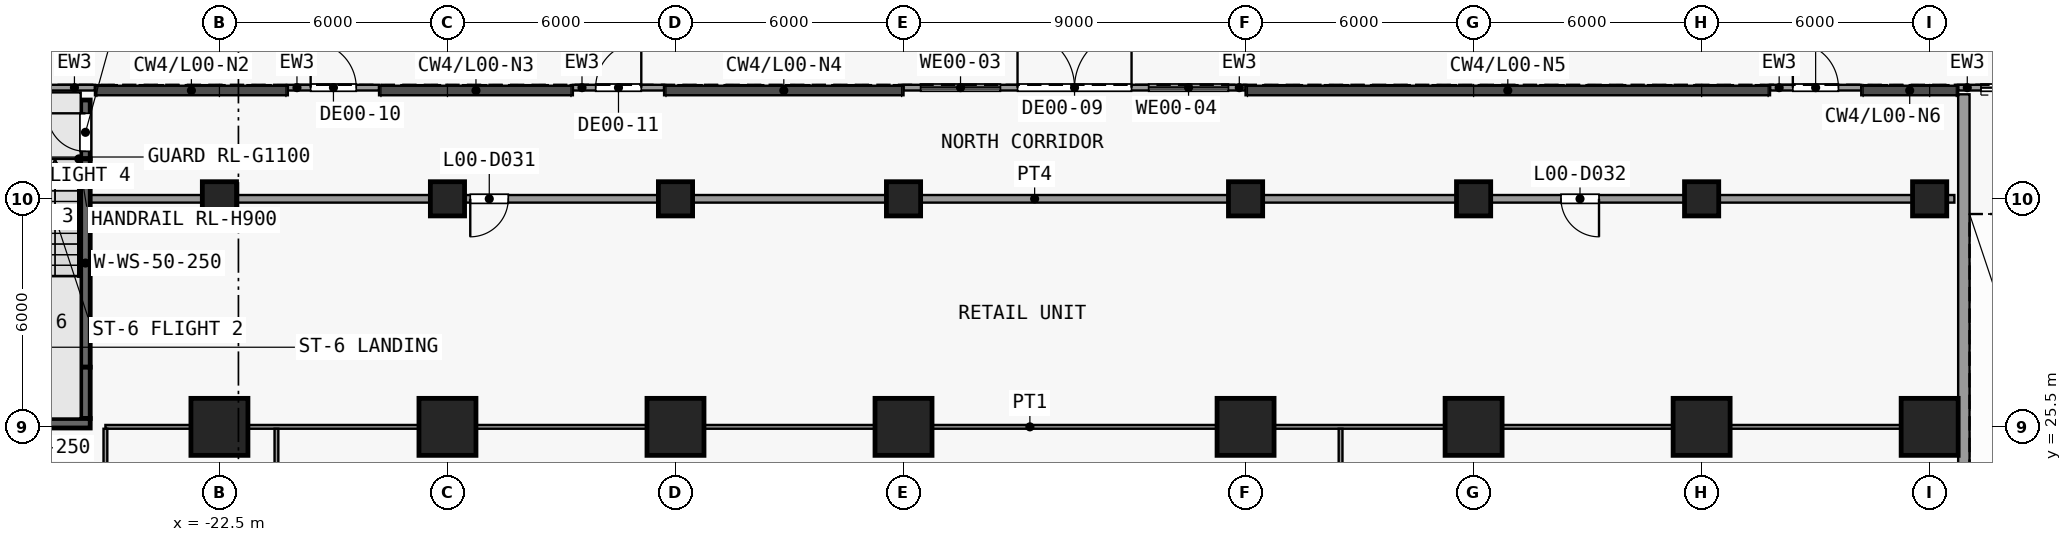
"""IFC4 building model, lengths in metres.
Left out: names, types, materials, properties, quantities, classifications, styles, units other than length and angle.
Written with IfcOpenShell. Run it as: python <this file> out.ifc"""

import sys

from ifc_helpers import new_model, si_unit, direction, frame, frame_2d, origin, origin_2d, place, context, subcontext, project, spatial, rectangle, extrude, element, fill, save


model = new_model("IFC4")
c1 = context("Model", 3, precision=1e-05, world=origin(), true_north=direction((0.0, 1.0)))
c2 = subcontext(c1, "Body", "Model", "MODEL_VIEW")
j1 = project(units=[si_unit("LENGTHUNIT", "METRE"), si_unit("PLANEANGLEUNIT", "RADIAN")], contexts=[c1])
p1 = place(None, origin())
s1 = spatial("IfcSite", under=j1, at=p1, CompositionType="ELEMENT")
p2 = place(p1, origin())
s2 = spatial("IfcBuilding", under=s1, at=p2, CompositionType="ELEMENT")
p3 = place(p2, origin())
s3 = spatial("IfcBuildingStorey", under=s2, at=p3, CompositionType="ELEMENT", Elevation=0.0)
p4 = place(p3, frame((-22.5, 25.5, 0.0), z_axis=(0.0, 0.0, 1.0), x_axis=(1.0, 0.0, 0.0)))
e1 = element("IfcColumn", 1, at=p4, inside=s3, PredefinedType="COLUMN", context=c2, shape_type="SweptSolid", body=[
    extrude(rectangle(XDim=1.5, YDim=1.5, at=origin_2d()), origin(), (0.0, 0.0, 1.0), 8.0),
])
p5 = place(p3, frame((-22.5, 31.5, 0.0), z_axis=(0.0, 0.0, 1.0), x_axis=(1.0, 0.0, 0.0)))
e2 = element("IfcColumn", 2, at=p5, inside=s3, PredefinedType="COLUMN", context=c2, shape_type="SweptSolid", body=[
    extrude(rectangle(XDim=0.9, YDim=0.9, at=origin_2d()), origin(), (0.0, 0.0, 1.0), 8.0),
])
p6 = place(p3, frame((-16.5, 25.5, 0.0), z_axis=(0.0, 0.0, 1.0), x_axis=(1.0, 0.0, 0.0)))
e3 = element("IfcColumn", 3, at=p6, inside=s3, PredefinedType="COLUMN", context=c2, shape_type="SweptSolid", body=[
    extrude(rectangle(XDim=1.5, YDim=1.5, at=origin_2d()), origin(), (0.0, 0.0, 1.0), 8.0),
])
p7 = place(p3, frame((-16.5, 31.5, 0.0), z_axis=(0.0, 0.0, 1.0), x_axis=(1.0, 0.0, 0.0)))
e4 = element("IfcColumn", 4, at=p7, inside=s3, PredefinedType="COLUMN", context=c2, shape_type="SweptSolid", body=[
    extrude(rectangle(XDim=0.9, YDim=0.9, at=origin_2d()), origin(), (0.0, 0.0, 1.0), 8.0),
])
p8 = place(p3, frame((-10.5, 25.5, 0.0), z_axis=(0.0, 0.0, 1.0), x_axis=(1.0, 0.0, 0.0)))
e5 = element("IfcColumn", 5, at=p8, inside=s3, PredefinedType="COLUMN", context=c2, shape_type="SweptSolid", body=[
    extrude(rectangle(XDim=1.5, YDim=1.5, at=origin_2d()), origin(), (0.0, 0.0, 1.0), 8.0),
])
p9 = place(p3, frame((-10.5, 31.5, 0.0), z_axis=(0.0, 0.0, 1.0), x_axis=(1.0, 0.0, 0.0)))
e6 = element("IfcColumn", 6, at=p9, inside=s3, PredefinedType="COLUMN", context=c2, shape_type="SweptSolid", body=[
    extrude(rectangle(XDim=0.9, YDim=0.9, at=origin_2d()), origin(), (0.0, 0.0, 1.0), 8.0),
])
p10 = place(p3, frame((-4.5, 25.5, 0.0), z_axis=(0.0, 0.0, 1.0), x_axis=(1.0, 0.0, 0.0)))
e7 = element("IfcColumn", 7, at=p10, inside=s3, PredefinedType="COLUMN", context=c2, shape_type="SweptSolid", body=[
    extrude(rectangle(XDim=1.5, YDim=1.5, at=origin_2d()), origin(), (0.0, 0.0, 1.0), 8.0),
])
p11 = place(p3, frame((-4.5, 31.5, 0.0), z_axis=(0.0, 0.0, 1.0), x_axis=(1.0, 0.0, 0.0)))
e8 = element("IfcColumn", 8, at=p11, inside=s3, PredefinedType="COLUMN", context=c2, shape_type="SweptSolid", body=[
    extrude(rectangle(XDim=0.9, YDim=0.9, at=origin_2d()), origin(), (0.0, 0.0, 1.0), 8.0),
])
p12 = place(p3, frame((4.5, 25.5, 0.0), z_axis=(0.0, 0.0, 1.0), x_axis=(1.0, 0.0, 0.0)))
e9 = element("IfcColumn", 9, at=p12, inside=s3, PredefinedType="COLUMN", context=c2, shape_type="SweptSolid", body=[
    extrude(rectangle(XDim=1.5, YDim=1.5, at=origin_2d()), origin(), (0.0, 0.0, 1.0), 8.0),
])
p13 = place(p3, frame((4.5, 31.5, 0.0), z_axis=(0.0, 0.0, 1.0), x_axis=(1.0, 0.0, 0.0)))
e10 = element("IfcColumn", 10, at=p13, inside=s3, PredefinedType="COLUMN", context=c2, shape_type="SweptSolid", body=[
    extrude(rectangle(XDim=0.9, YDim=0.9, at=origin_2d()), origin(), (0.0, 0.0, 1.0), 8.0),
])
p14 = place(p3, frame((10.5, 25.5, 0.0), z_axis=(0.0, 0.0, 1.0), x_axis=(1.0, 0.0, 0.0)))
e11 = element("IfcColumn", 11, at=p14, inside=s3, PredefinedType="COLUMN", context=c2, shape_type="SweptSolid", body=[
    extrude(rectangle(XDim=1.5, YDim=1.5, at=origin_2d()), origin(), (0.0, 0.0, 1.0), 8.0),
])
p15 = place(p3, frame((10.5, 31.5, 0.0), z_axis=(0.0, 0.0, 1.0), x_axis=(1.0, 0.0, 0.0)))
e12 = element("IfcColumn", 12, at=p15, inside=s3, PredefinedType="COLUMN", context=c2, shape_type="SweptSolid", body=[
    extrude(rectangle(XDim=0.9, YDim=0.9, at=origin_2d()), origin(), (0.0, 0.0, 1.0), 8.0),
])
p16 = place(p3, frame((16.5, 25.5, 0.0), z_axis=(0.0, 0.0, 1.0), x_axis=(1.0, 0.0, 0.0)))
e13 = element("IfcColumn", 13, at=p16, inside=s3, PredefinedType="COLUMN", context=c2, shape_type="SweptSolid", body=[
    extrude(rectangle(XDim=1.5, YDim=1.5, at=origin_2d()), origin(), (0.0, 0.0, 1.0), 8.0),
])
p17 = place(p3, frame((16.5, 31.5, 0.0), z_axis=(0.0, 0.0, 1.0), x_axis=(1.0, 0.0, 0.0)))
e14 = element("IfcColumn", 14, at=p17, inside=s3, PredefinedType="COLUMN", context=c2, shape_type="SweptSolid", body=[
    extrude(rectangle(XDim=0.9, YDim=0.9, at=origin_2d()), origin(), (0.0, 0.0, 1.0), 8.0),
])
p18 = place(p3, frame((22.5, 25.5, 0.0), z_axis=(0.0, 0.0, 1.0), x_axis=(1.0, 0.0, 0.0)))
e15 = element("IfcColumn", 15, at=p18, inside=s3, PredefinedType="COLUMN", context=c2, shape_type="SweptSolid", body=[
    extrude(rectangle(XDim=1.5, YDim=1.5, at=origin_2d()), origin(), (0.0, 0.0, 1.0), 8.0),
])
p19 = place(p3, frame((22.5, 31.5, 0.0), z_axis=(0.0, 0.0, 1.0), x_axis=(1.0, 0.0, 0.0)))
e16 = element("IfcColumn", 16, at=p19, inside=s3, PredefinedType="COLUMN", context=c2, shape_type="SweptSolid", body=[
    extrude(rectangle(XDim=0.9, YDim=0.9, at=origin_2d()), origin(), (0.0, 0.0, 1.0), 8.0),
])
p20 = place(p3, frame((23.4, 9.6, 0.0), z_axis=(0.0, 0.0, 1.0), x_axis=(0.0, 1.0, 0.0)))
e17 = element("IfcWall", 17, at=p20, inside=s3, PredefinedType="SOLIDWALL", context=c2, shape_type="SweptSolid", body=[
    extrude(rectangle(XDim=24.65, YDim=0.3, at=frame_2d((12.325, 0.0))), origin(), (0.0, 0.0, 1.0), 7.65),
])
p21 = place(p3, frame((-29.375, 34.425, 0.0), z_axis=(0.0, 0.0, 1.0), x_axis=(1.0, 0.0, 0.0)))
e18 = element("IfcWall", 18, at=p21, inside=s3, PredefinedType="SOLIDWALL", context=c2, shape_type="SweptSolid", body=[
    extrude(rectangle(XDim=3.6, YDim=0.15, at=frame_2d((1.8, 0.0))), origin(), (0.0, 0.0, 1.0), 7.65),
])
p22 = place(p21, frame((1.2, 0.0, 0.0)))
e19 = element("IfcOpeningElement", 19, at=p22, cuts=e18, PredefinedType="OPENING", context=c2, shape_type="SweptSolid", body=[
    extrude(rectangle(XDim=1.2, YDim=2.4, at=frame_2d((0.6, 1.2))), frame((0.0, 0.085, 0.0), z_axis=(0.0, -1.0, 0.0), x_axis=(1.0, 0.0, 0.0)), (0.0, 0.0, 1.0), 0.17),
])
p23 = place(p3, frame((-4.5, 34.425, 0.0), z_axis=(0.0, 0.0, 1.0), x_axis=(1.0, 0.0, 0.0)))
e20 = element("IfcWall", 20, at=p23, inside=s3, PredefinedType="SOLIDWALL", context=c2, shape_type="SweptSolid", body=[
    extrude(rectangle(XDim=9.0, YDim=0.15, at=frame_2d((4.5, 0.0))), origin(), (0.0, 0.0, 1.0), 7.65),
])
p24 = place(p23, frame((3.0, 0.0, 0.0)))
e21 = element("IfcOpeningElement", 21, at=p24, cuts=e20, PredefinedType="OPENING", context=c2, shape_type="SweptSolid", body=[
    extrude(rectangle(XDim=3.0, YDim=3.6, at=frame_2d((1.5, 1.8))), frame((0.0, 0.085, 0.0), z_axis=(0.0, -1.0, 0.0), x_axis=(1.0, 0.0, 0.0)), (0.0, 0.0, 1.0), 0.17),
])
p25 = place(p23, frame((0.45, 0.0, 0.0)))
e22 = element("IfcOpeningElement", 22, at=p25, cuts=e20, PredefinedType="OPENING", context=c2, shape_type="SweptSolid", body=[
    extrude(rectangle(XDim=2.1, YDim=5.0, at=frame_2d((1.05, 2.5))), frame((0.0, 0.085, 0.0), z_axis=(0.0, -1.0, 0.0), x_axis=(1.0, 0.0, 0.0)), (0.0, 0.0, 1.0), 0.17),
])
p26 = place(p23, frame((6.45, 0.0, 0.0)))
e23 = element("IfcOpeningElement", 23, at=p26, cuts=e20, PredefinedType="OPENING", context=c2, shape_type="SweptSolid", body=[
    extrude(rectangle(XDim=2.1, YDim=5.0, at=frame_2d((1.05, 2.5))), frame((0.0, 0.085, 0.0), z_axis=(0.0, -1.0, 0.0), x_axis=(1.0, 0.0, 0.0)), (0.0, 0.0, 1.0), 0.17),
])
p27 = place(p3, frame((-20.7, 34.425, 0.0), z_axis=(0.0, 0.0, 1.0), x_axis=(1.0, 0.0, 0.0)))
e24 = element("IfcWall", 24, at=p27, inside=s3, PredefinedType="SOLIDWALL", context=c2, shape_type="SweptSolid", body=[
    extrude(rectangle(XDim=2.4, YDim=0.15, at=frame_2d((1.2, 0.0))), origin(), (0.0, 0.0, 1.0), 7.65),
])
p28 = place(p27, frame((0.6, 0.0, 0.0)))
e25 = element("IfcOpeningElement", 25, at=p28, cuts=e24, PredefinedType="OPENING", context=c2, shape_type="SweptSolid", body=[
    extrude(rectangle(XDim=1.2, YDim=2.4, at=frame_2d((0.6, 1.2))), frame((0.0, 0.085, 0.0), z_axis=(0.0, -1.0, 0.0), x_axis=(1.0, 0.0, 0.0)), (0.0, 0.0, 1.0), 0.17),
])
p29 = place(p3, frame((-13.2, 34.425, 0.0), z_axis=(0.0, 0.0, 1.0), x_axis=(1.0, 0.0, 0.0)))
e26 = element("IfcWall", 26, at=p29, inside=s3, PredefinedType="SOLIDWALL", context=c2, shape_type="SweptSolid", body=[
    extrude(rectangle(XDim=2.4, YDim=0.15, at=frame_2d((1.2, 0.0))), origin(), (0.0, 0.0, 1.0), 7.65),
])
p30 = place(p29, frame((0.6, 0.0, 0.0)))
e27 = element("IfcOpeningElement", 27, at=p30, cuts=e26, PredefinedType="OPENING", context=c2, shape_type="SweptSolid", body=[
    extrude(rectangle(XDim=1.2, YDim=2.4, at=frame_2d((0.6, 1.2))), frame((0.0, 0.085, 0.0), z_axis=(0.0, -1.0, 0.0), x_axis=(1.0, 0.0, 0.0)), (0.0, 0.0, 1.0), 0.17),
])
p31 = place(p3, frame((18.3, 34.425, 0.0), z_axis=(0.0, 0.0, 1.0), x_axis=(1.0, 0.0, 0.0)))
e28 = element("IfcWall", 28, at=p31, inside=s3, PredefinedType="SOLIDWALL", context=c2, shape_type="SweptSolid", body=[
    extrude(rectangle(XDim=2.4, YDim=0.15, at=frame_2d((1.2, 0.0))), origin(), (0.0, 0.0, 1.0), 7.65),
])
p32 = place(p31, frame((0.6, 0.0, 0.0)))
e29 = element("IfcOpeningElement", 29, at=p32, cuts=e28, PredefinedType="OPENING", context=c2, shape_type="SweptSolid", body=[
    extrude(rectangle(XDim=1.2, YDim=2.4, at=frame_2d((0.6, 1.2))), frame((0.0, 0.085, 0.0), z_axis=(0.0, -1.0, 0.0), x_axis=(1.0, 0.0, 0.0)), (0.0, 0.0, 1.0), 0.17),
])
p33 = place(p3, frame((23.25, 34.425, 0.0), z_axis=(0.0, 0.0, 1.0), x_axis=(1.0, 0.0, 0.0)))
e30 = element("IfcWall", 30, at=p33, inside=s3, PredefinedType="SOLIDWALL", context=c2, shape_type="SweptSolid", body=[
    extrude(rectangle(XDim=7.7, YDim=0.15, at=frame_2d((3.85, 0.0))), origin(), (0.0, 0.0, 1.0), 7.65),
])
p34 = place(p33, frame((0.6, 0.0, 0.0)))
e31 = element("IfcOpeningElement", 31, at=p34, cuts=e30, PredefinedType="OPENING", context=c2, shape_type="SweptSolid", body=[
    extrude(rectangle(XDim=6.5, YDim=4.5, at=frame_2d((3.25, 2.25))), frame((0.0, 0.085, 0.0), z_axis=(0.0, -1.0, 0.0), x_axis=(1.0, 0.0, 0.0)), (0.0, 0.0, 1.0), 0.17),
])
p35 = place(p3, frame((-26.025, 32.55, 0.0), z_axis=(0.0, 0.0, 1.0), x_axis=(0.0, 1.0, 0.0)))
e32 = element("IfcWall", 32, at=p35, inside=s3, PredefinedType="SHEAR", context=c2, shape_type="SweptSolid", body=[
    extrude(rectangle(XDim=1.55, YDim=0.25, at=frame_2d((0.775, 0.0))), origin(), (0.0, 0.0, 1.0), 7.65),
])
p36 = place(p35, frame((0.2, 0.0, 0.0)))
e33 = element("IfcOpeningElement", 33, at=p36, cuts=e32, PredefinedType="OPENING", context=c2, shape_type="SweptSolid", body=[
    extrude(rectangle(XDim=1.0, YDim=2.1, at=frame_2d((0.5, 1.05))), frame((0.0, 0.135, 0.0), z_axis=(0.0, -1.0, 0.0), x_axis=(1.0, 0.0, 0.0)), (0.0, 0.0, 1.0), 0.27),
])
p37 = place(p3, frame((-26.025, 27.07, 0.0), z_axis=(0.0, 0.0, 1.0), x_axis=(0.0, 1.0, 0.0)))
e34 = element("IfcWall", 34, at=p37, inside=s3, PredefinedType="SHEAR", context=c2, shape_type="SweptSolid", body=[
    extrude(rectangle(XDim=5.48, YDim=0.25, at=frame_2d((2.74, 0.0))), origin(), (0.0, 0.0, 1.0), 7.65),
])
p38 = place(p3, frame((-26.025, 25.72, 0.0), z_axis=(0.0, 0.0, 1.0), x_axis=(0.0, 1.0, 0.0)))
e35 = element("IfcWall", 35, at=p38, inside=s3, PredefinedType="SHEAR", context=c2, shape_type="SweptSolid", body=[
    extrude(rectangle(XDim=1.35, YDim=0.25, at=frame_2d((0.675, 0.0))), origin(), (0.0, 0.0, 1.0), 7.65),
])
p39 = place(p3, frame((-29.25, 25.595, 0.0), z_axis=(0.0, 0.0, 1.0), x_axis=(1.0, 0.0, 0.0)))
e36 = element("IfcWall", 36, at=p39, inside=s3, PredefinedType="SHEAR", context=c2, shape_type="SweptSolid", body=[
    extrude(rectangle(XDim=3.35, YDim=0.25, at=frame_2d((1.675, 0.0))), origin(), (0.0, 0.0, 1.0), 7.65),
])
p40 = place(p3, frame((-25.5, 25.5, 0.0), z_axis=(0.0, 0.0, 1.0), x_axis=(1.0, 0.0, 0.0)))
e37 = element("IfcWall", 37, at=p40, inside=s3, PredefinedType="PARTITIONING", context=c2, shape_type="SweptSolid", body=[
    extrude(rectangle(XDim=48.65, YDim=0.1, at=frame_2d((24.325, 0.0))), origin(), (0.0, 0.0, 1.0), 7.65),
])
p41 = place(p3, frame((-25.9, 31.5, 0.0), z_axis=(0.0, 0.0, 1.0), x_axis=(1.0, 0.0, 0.0)))
e38 = element("IfcWall", 38, at=p41, inside=s3, PredefinedType="PARTITIONING", context=c2, shape_type="SweptSolid", body=[
    extrude(rectangle(XDim=49.05, YDim=0.2, at=frame_2d((24.525, 0.0))), origin(), (0.0, 0.0, 1.0), 7.65),
])
p42 = place(p41, frame((10.0, 0.0, 0.0)))
e39 = element("IfcOpeningElement", 39, at=p42, cuts=e38, PredefinedType="OPENING", context=c2, shape_type="SweptSolid", body=[
    extrude(rectangle(XDim=1.0, YDim=2.1, at=frame_2d((0.5, 1.05))), frame((0.0, 0.11, 0.0), z_axis=(0.0, -1.0, 0.0), x_axis=(1.0, 0.0, 0.0)), (0.0, 0.0, 1.0), 0.22),
])
p43 = place(p41, frame((38.7, 0.0, 0.0)))
e40 = element("IfcOpeningElement", 40, at=p43, cuts=e38, PredefinedType="OPENING", context=c2, shape_type="SweptSolid", body=[
    extrude(rectangle(XDim=1.0, YDim=2.1, at=frame_2d((0.5, 1.05))), frame((0.0, 0.11, 0.0), z_axis=(0.0, -1.0, 0.0), x_axis=(1.0, 0.0, 0.0)), (0.0, 0.0, 1.0), 0.22),
])
for number, where, z_axis, x_axis in (
    (41, (-25.5, 19.6, 0.0), (0.0, 0.0, 1.0), (0.0, 1.0, 0.0)),
    (42, (-21.0, 19.6, 0.0), (0.0, 0.0, 1.0), (0.0, 1.0, 0.0)),
    (43, (7.0, 19.6, 0.0), (0.0, 0.0, 1.0), (0.0, 1.0, 0.0)),
):
    element("IfcWall", number, at=place(p3, frame(where, z_axis=z_axis, x_axis=x_axis)), inside=s3, PredefinedType="PARTITIONING", context=c2, shape_type="SweptSolid", body=[
        extrude(rectangle(XDim=5.85, YDim=0.1, at=frame_2d((2.925, 0.0))), origin(), (0.0, 0.0, 1.0), 7.65),
    ])
p44 = place(p24, origin())
e44 = element("IfcDoor", 44, at=p44, inside=s3, OperationType="DOUBLE_DOOR_SINGLE_SWING", PredefinedType="DOOR", context=c2, shape_type="SweptSolid", body=[
    extrude(rectangle(XDim=3.0, YDim=3.6, at=frame_2d((1.5, 1.8))), frame((0.0, 0.025, 0.0), z_axis=(0.0, -1.0, 0.0), x_axis=(1.0, 0.0, 0.0)), (0.0, 0.0, 1.0), 0.05),
])
fill(e21, e44)
p45 = place(p25, origin())
e45 = element("IfcWindow", 45, at=p45, inside=s3, PartitioningType="SINGLE_PANEL", PredefinedType="WINDOW", context=c2, shape_type="SweptSolid", body=[
    extrude(rectangle(XDim=2.1, YDim=5.0, at=frame_2d((1.05, 2.5))), frame((0.0, 0.03, 0.0), z_axis=(0.0, -1.0, 0.0), x_axis=(1.0, 0.0, 0.0)), (0.0, 0.0, 1.0), 0.06),
])
fill(e22, e45)
p46 = place(p26, origin())
e46 = element("IfcWindow", 46, at=p46, inside=s3, PartitioningType="SINGLE_PANEL", PredefinedType="WINDOW", context=c2, shape_type="SweptSolid", body=[
    extrude(rectangle(XDim=2.1, YDim=5.0, at=frame_2d((1.05, 2.5))), frame((0.0, 0.03, 0.0), z_axis=(0.0, -1.0, 0.0), x_axis=(1.0, 0.0, 0.0)), (0.0, 0.0, 1.0), 0.06),
])
fill(e23, e46)
p47 = place(p28, origin())
e47 = element("IfcDoor", 47, at=p47, inside=s3, OperationType="SINGLE_SWING_LEFT", PredefinedType="DOOR", context=c2, shape_type="SweptSolid", body=[
    extrude(rectangle(XDim=1.2, YDim=2.4, at=frame_2d((0.6, 1.2))), frame((0.0, 0.025, 0.0), z_axis=(0.0, -1.0, 0.0), x_axis=(1.0, 0.0, 0.0)), (0.0, 0.0, 1.0), 0.05),
])
fill(e25, e47)
p48 = place(p30, origin())
e48 = element("IfcDoor", 48, at=p48, inside=s3, OperationType="SINGLE_SWING_RIGHT", PredefinedType="DOOR", context=c2, shape_type="SweptSolid", body=[
    extrude(rectangle(XDim=1.2, YDim=2.4, at=frame_2d((0.6, 1.2))), frame((0.0, 0.025, 0.0), z_axis=(0.0, -1.0, 0.0), x_axis=(1.0, 0.0, 0.0)), (0.0, 0.0, 1.0), 0.05),
])
fill(e27, e48)
p49 = place(p32, origin())
e49 = element("IfcDoor", 49, at=p49, inside=s3, OperationType="SINGLE_SWING_LEFT", PredefinedType="DOOR", context=c2, shape_type="SweptSolid", body=[
    extrude(rectangle(XDim=1.2, YDim=2.4, at=frame_2d((0.6, 1.2))), frame((0.0, 0.025, 0.0), z_axis=(0.0, -1.0, 0.0), x_axis=(1.0, 0.0, 0.0)), (0.0, 0.0, 1.0), 0.05),
])
fill(e29, e49)
p50 = place(p34, origin())
e50 = element("IfcDoor", 50, at=p50, inside=s3, OperationType="ROLLINGUP", PredefinedType="DOOR", context=c2, shape_type="SweptSolid", body=[
    extrude(rectangle(XDim=6.5, YDim=4.5, at=frame_2d((3.25, 2.25))), frame((0.0, 0.025, 0.0), z_axis=(0.0, -1.0, 0.0), x_axis=(1.0, 0.0, 0.0)), (0.0, 0.0, 1.0), 0.05),
])
fill(e31, e50)
p51 = place(p36, origin())
e51 = element("IfcDoor", 51, at=p51, inside=s3, OperationType="SINGLE_SWING_RIGHT", PredefinedType="DOOR", context=c2, shape_type="SweptSolid", body=[
    extrude(rectangle(XDim=1.0, YDim=2.1, at=frame_2d((0.5, 1.05))), frame((0.0, 0.025, 0.0), z_axis=(0.0, -1.0, 0.0), x_axis=(1.0, 0.0, 0.0)), (0.0, 0.0, 1.0), 0.05),
])
fill(e33, e51)
p52 = place(p42, origin())
e52 = element("IfcDoor", 52, at=p52, inside=s3, OperationType="SINGLE_SWING_LEFT", PredefinedType="DOOR", context=c2, shape_type="SweptSolid", body=[
    extrude(rectangle(XDim=1.0, YDim=2.1, at=frame_2d((0.5, 1.05))), frame((0.0, 0.025, 0.0), z_axis=(0.0, -1.0, 0.0), x_axis=(1.0, 0.0, 0.0)), (0.0, 0.0, 1.0), 0.05),
])
fill(e39, e52)
p53 = place(p43, origin())
e53 = element("IfcDoor", 53, at=p53, inside=s3, OperationType="SINGLE_SWING_RIGHT", PredefinedType="DOOR", context=c2, shape_type="SweptSolid", body=[
    extrude(rectangle(XDim=1.0, YDim=2.1, at=frame_2d((0.5, 1.05))), frame((0.0, 0.025, 0.0), z_axis=(0.0, -1.0, 0.0), x_axis=(1.0, 0.0, 0.0)), (0.0, 0.0, 1.0), 0.05),
])
fill(e40, e53)
save(model, sys.argv[1])
